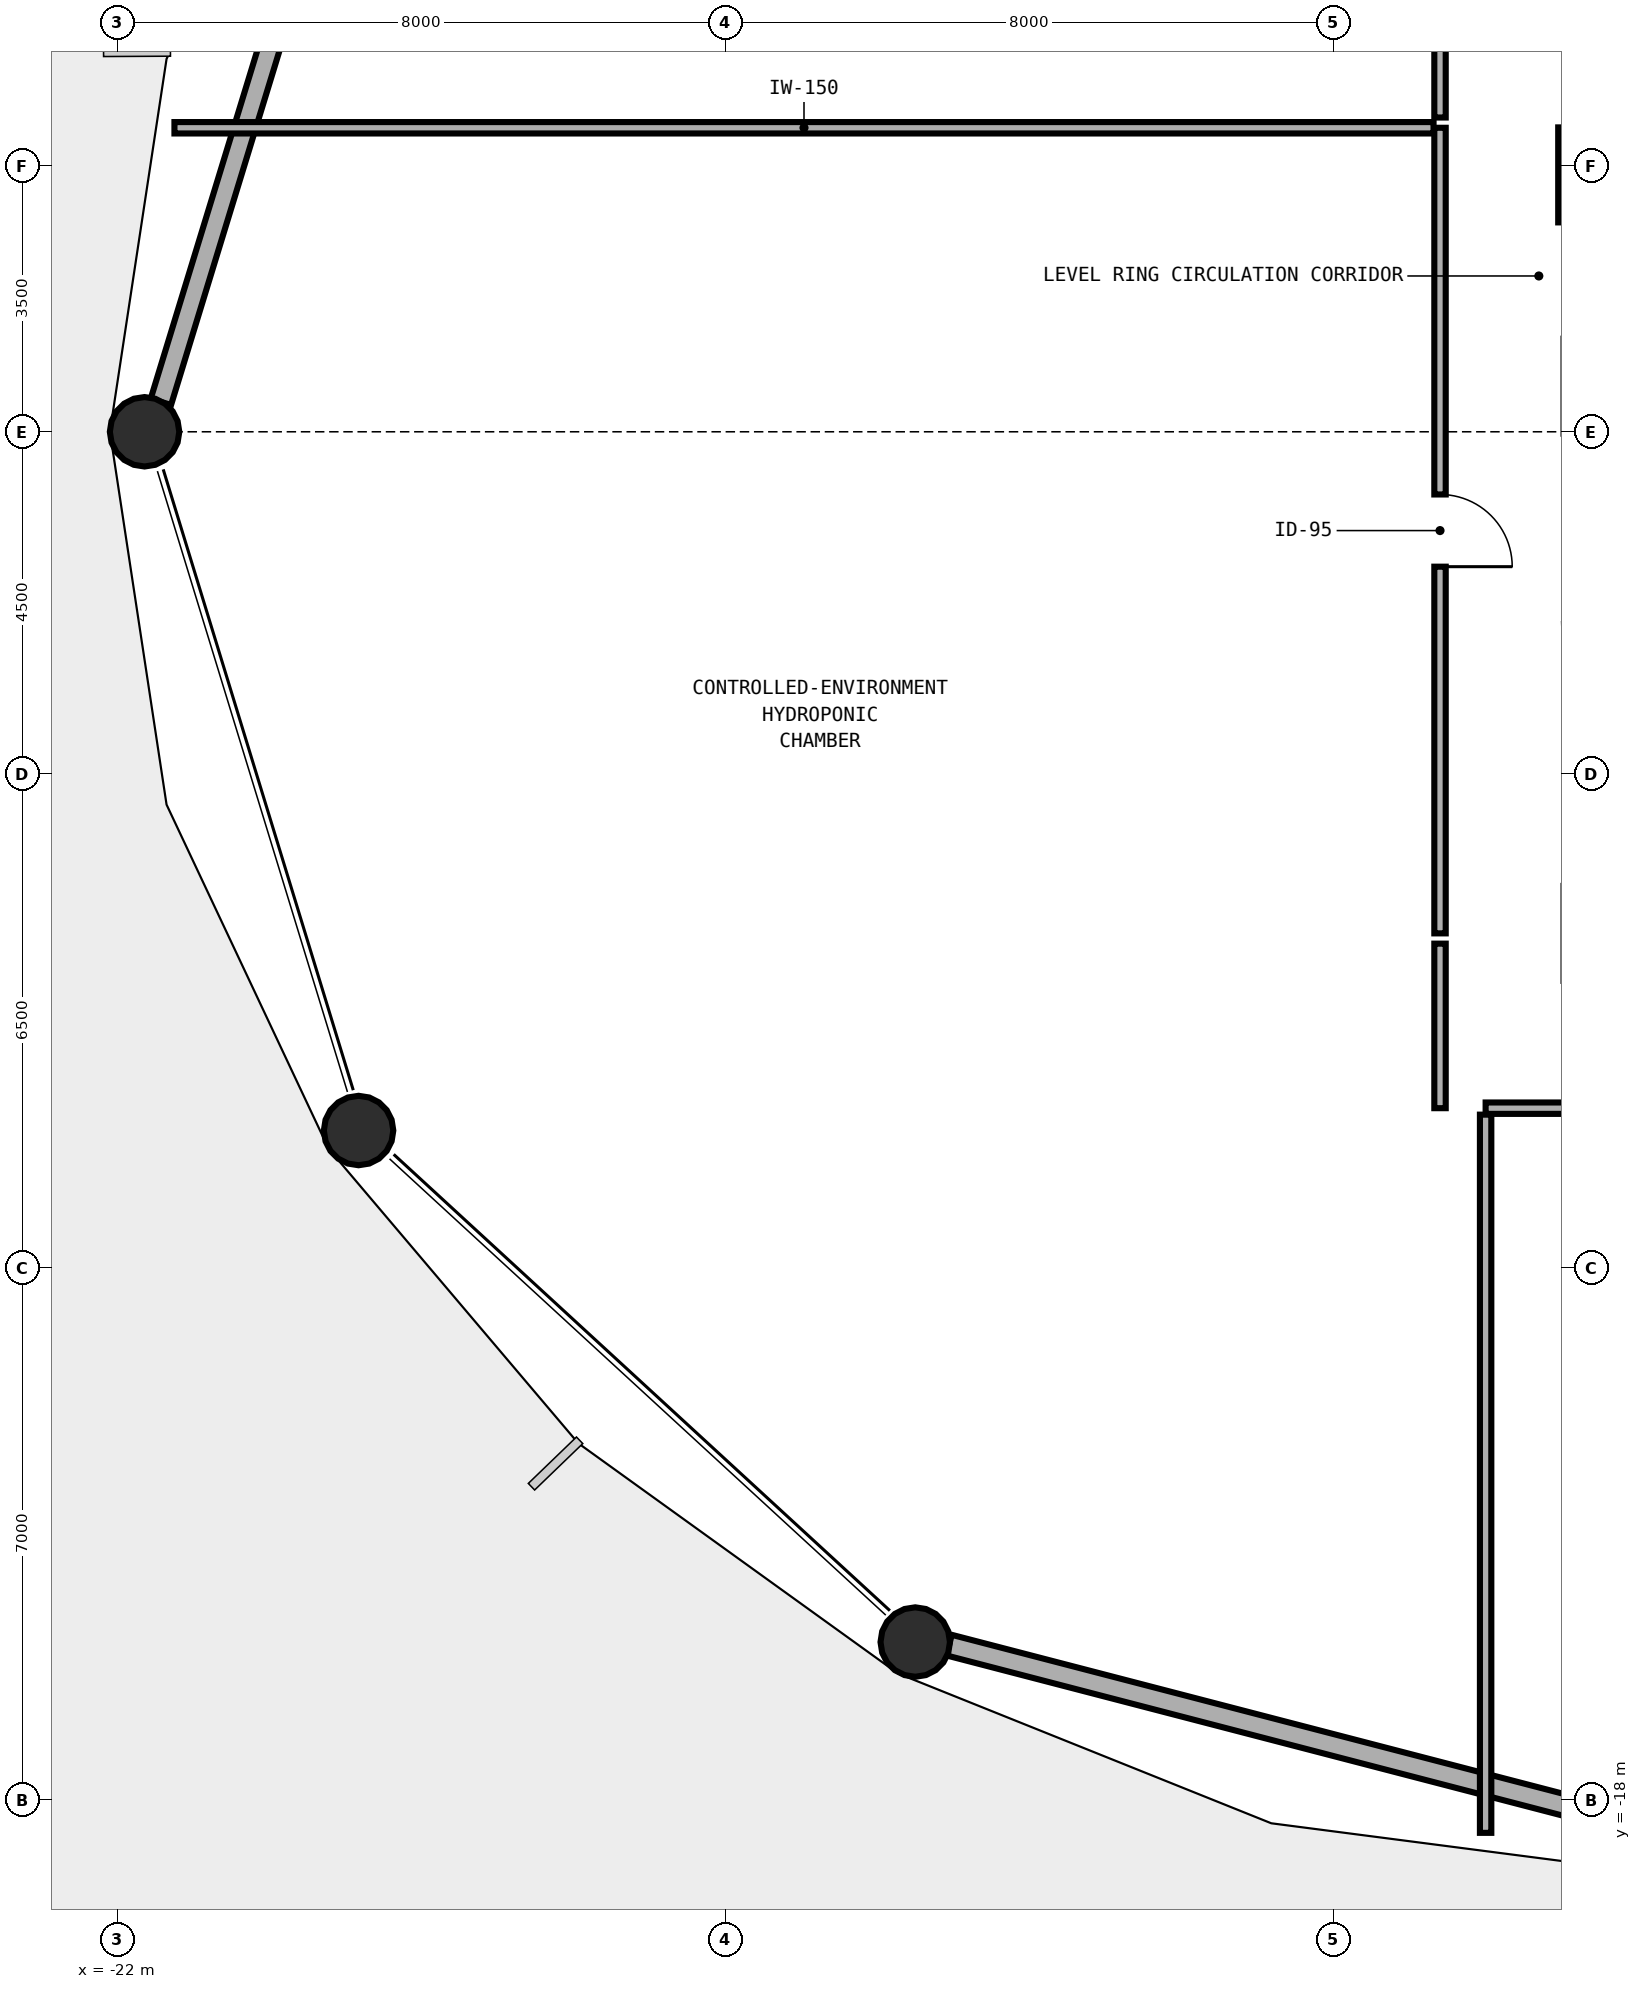
"""IFC4 building model, lengths in metres.
Left out: names, types, materials, properties, quantities, classifications, styles, units other than length and angle.
Written with IfcOpenShell. Run it as: python <this file> out.ifc"""

import sys

from ifc_helpers import new_model, si_unit, direction, frame, frame_2d, origin, origin_2d, place, context, subcontext, project, spatial, rectangle, hollow_circle, extrude, element, fill, save


model = new_model("IFC4")
c1 = context("Model", 3, precision=1e-05, world=origin(), true_north=direction((0.0, 1.0)))
c2 = subcontext(c1, "Body", "Model", "MODEL_VIEW")
j1 = project(units=[si_unit("LENGTHUNIT", "METRE"), si_unit("PLANEANGLEUNIT", "RADIAN")], contexts=[c1])
p1 = place(None, origin())
s1 = spatial("IfcSite", under=j1, at=p1, CompositionType="ELEMENT")
p2 = place(p1, origin())
s2 = spatial("IfcBuilding", under=s1, at=p2, CompositionType="ELEMENT")
p3 = place(p2, frame((0.0, 0.0, 27.6)))
s3 = spatial("IfcBuildingStorey", under=s2, at=p3, CompositionType="ELEMENT", Elevation=27.6)
p4 = place(p3, frame((-2.42, 3.38, 0.0), z_axis=(0.0, 0.0, 1.0), x_axis=(1.0, 0.0, 0.0)))
e1 = element("IfcColumn", 1, at=p4, inside=s3, PredefinedType="COLUMN", context=c2, shape_type="SweptSolid", body=[
    extrude(rectangle(XDim=1.25, YDim=1.25, at=origin_2d()), origin(), (0.0, 0.0, 1.0), 3.875),
])
p5 = place(p3, frame((-21.55, 0.0, 0.0), z_axis=(-0.048456117097, 0.0, 0.998825312412), x_axis=(0.0, -1.0, 0.0)))
e2 = element("IfcColumn", 2, at=p5, inside=s3, PredefinedType="COLUMN", context=c2, shape_type="SweptSolid", body=[
    extrude(hollow_circle(Radius=0.457, WallThickness=0.032, at=origin_2d()), origin(), (0.0, 0.0, 1.0), 3.88),
])
p6 = place(p3, frame((-18.747, -9.157, 0.0), z_axis=(-0.041979196917, -0.018818260687, 0.998941249569), x_axis=(0.409055904093, -0.912509324515, 0.0)))
e3 = element("IfcColumn", 3, at=p6, inside=s3, PredefinedType="COLUMN", context=c2, shape_type="SweptSolid", body=[
    extrude(hollow_circle(Radius=0.457, WallThickness=0.032, at=origin_2d()), origin(), (0.0, 0.0, 1.0), 3.879),
])
p7 = place(p3, frame((-11.458, -15.861, 0.0), z_axis=(-0.024236523215, -0.032609140326, 0.999174276545), x_axis=(0.802595483818, -0.596523670406, 0.0)))
e4 = element("IfcColumn", 4, at=p7, inside=s3, PredefinedType="COLUMN", context=c2, shape_type="SweptSolid", body=[
    extrude(hollow_circle(Radius=0.457, WallThickness=0.032, at=origin_2d()), origin(), (0.0, 0.0, 1.0), 3.878),
])
p8 = place(p3, frame((-21.429, 0.394, 0.0), z_axis=(0.0, 0.0, 1.0), x_axis=(0.292709587844, 0.956201389449, 0.0)))
e5 = element("IfcWall", 5, at=p8, inside=s3, PredefinedType="SOLIDWALL", context=c2, shape_type="SweptSolid", body=[
    extrude(rectangle(XDim=8.753, YDim=0.28, at=frame_2d((4.376, 0.0))), origin(), (0.0, 0.0, 1.0), 3.06),
])
p9 = place(p3, frame((-1.899, -18.346, 0.0), z_axis=(0.0, 0.0, 1.0), x_axis=(-0.967836325918, 0.251580695274, 0.0)))
e6 = element("IfcWall", 6, at=p9, inside=s3, PredefinedType="SOLIDWALL", context=c2, shape_type="SweptSolid", body=[
    extrude(rectangle(XDim=9.465, YDim=0.28, at=frame_2d((4.732, 0.0))), origin(), (0.0, 0.0, 1.0), 3.06),
])
p10 = place(p3, frame((-4.6, 4.0, 0.0), z_axis=(0.0, 0.0, 1.0), x_axis=(0.0, -1.0, 0.0)))
e7 = element("IfcWall", 7, at=p10, inside=s3, PredefinedType="PARTITIONING", context=c2, shape_type="SweptSolid", body=[
    extrude(rectangle(XDim=10.6, YDim=0.15, at=frame_2d((5.3, 0.0))), origin(), (0.0, 0.0, 1.0), 3.64),
])
p11 = place(p10, frame((4.825, 0.0, 0.0)))
e8 = element("IfcOpeningElement", 8, at=p11, cuts=e7, PredefinedType="OPENING", context=c2, shape_type="SweptSolid", body=[
    extrude(rectangle(XDim=0.95, YDim=2.1, at=frame_2d((0.475, 1.05))), frame((0.0, 0.085, 0.0), z_axis=(0.0, -1.0, 0.0), x_axis=(1.0, 0.0, 0.0)), (0.0, 0.0, 1.0), 0.17),
])
p12 = place(p3, frame((-4.6, 12.5, 0.0), z_axis=(0.0, 0.0, 1.0), x_axis=(0.0, -1.0, 0.0)))
e9 = element("IfcWall", 9, at=p12, inside=s3, PredefinedType="PARTITIONING", context=c2, shape_type="SweptSolid", body=[
    extrude(rectangle(XDim=8.365, YDim=0.15, at=frame_2d((4.183, 0.0))), origin(), (0.0, 0.0, 1.0), 3.64),
])
p13 = place(p12, frame((3.775, 0.0, 0.0)))
e10 = element("IfcOpeningElement", 10, at=p13, cuts=e9, PredefinedType="OPENING", context=c2, shape_type="SweptSolid", body=[
    extrude(rectangle(XDim=0.95, YDim=2.1, at=frame_2d((0.475, 1.05))), frame((0.0, 0.085, 0.0), z_axis=(0.0, -1.0, 0.0), x_axis=(1.0, 0.0, 0.0)), (0.0, 0.0, 1.0), 0.17),
])
p14 = place(p3, frame((-4.0, -8.9, 0.0), z_axis=(0.0, 0.0, 1.0), x_axis=(1.0, 0.0, 0.0)))
e11 = element("IfcWall", 11, at=p14, inside=s3, PredefinedType="PARTITIONING", context=c2, shape_type="SweptSolid", body=[
    extrude(rectangle(XDim=1.865, YDim=0.15, at=frame_2d((0.933, 0.0))), origin(), (0.0, 0.0, 1.0), 3.64),
])
p15 = place(p3, frame((-4.0, -18.435, 0.0), z_axis=(0.0, 0.0, 1.0), x_axis=(0.0, 1.0, 0.0)))
e12 = element("IfcWall", 12, at=p15, inside=s3, PredefinedType="PARTITIONING", context=c2, shape_type="SweptSolid", body=[
    extrude(rectangle(XDim=9.45, YDim=0.15, at=frame_2d((4.725, 0.0))), origin(), (0.0, 0.0, 1.0), 3.64),
])
p16 = place(p3, frame((-4.6, -6.735, 0.0), z_axis=(0.0, 0.0, 1.0), x_axis=(0.0, -1.0, 0.0)))
e13 = element("IfcWall", 13, at=p16, inside=s3, PredefinedType="PARTITIONING", context=c2, shape_type="SweptSolid", body=[
    extrude(rectangle(XDim=2.165, YDim=0.15, at=frame_2d((1.083, 0.0))), origin(), (0.0, 0.0, 1.0), 3.64),
])
p17 = place(p3, frame((-21.251, 4.0, 0.0), z_axis=(0.0, 0.0, 1.0), x_axis=(1.0, 0.0, 0.0)))
e14 = element("IfcWall", 14, at=p17, inside=s3, PredefinedType="PARTITIONING", context=c2, shape_type="SweptSolid", body=[
    extrude(rectangle(XDim=16.566, YDim=0.15, at=frame_2d((8.283, 0.0))), origin(), (0.0, 0.0, 1.0), 3.64),
])
p18 = place(p11, origin())
e15 = element("IfcDoor", 15, at=p18, inside=s3, OperationType="SINGLE_SWING_RIGHT", PredefinedType="DOOR", context=c2, shape_type="SweptSolid", body=[
    extrude(rectangle(XDim=0.95, YDim=2.1, at=frame_2d((0.475, 1.05))), frame((0.0, 0.025, 0.0), z_axis=(0.0, -1.0, 0.0), x_axis=(1.0, 0.0, 0.0)), (0.0, 0.0, 1.0), 0.05),
])
fill(e8, e15)
save(model, sys.argv[1])
